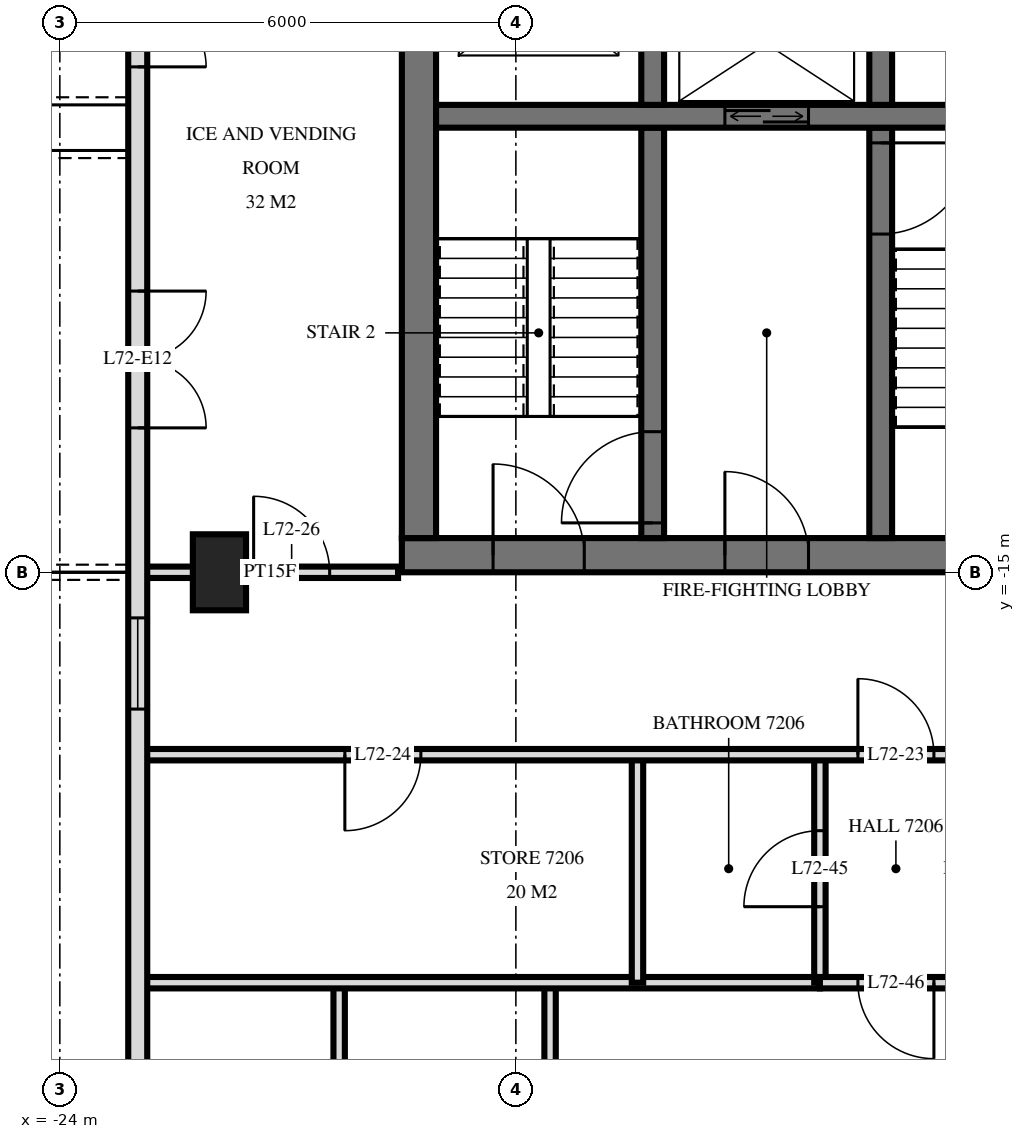
"""IFC4 building model, lengths in metres.
Left out: names, types, materials, properties, quantities, classifications, styles, units other than length and angle.
Written with IfcOpenShell. Run it as: python <this file> out.ifc"""

import sys

from ifc_helpers import new_model, si_unit, direction, frame, frame_2d, origin, origin_2d, place, context, subcontext, project, spatial, rectangle, extrude, element, fill, save


model = new_model("IFC4")
c1 = context("Model", 3, precision=1e-05, world=origin(), true_north=direction((0.0, 1.0)))
c2 = subcontext(c1, "Body", "Model", "MODEL_VIEW")
j1 = project(units=[si_unit("LENGTHUNIT", "METRE"), si_unit("PLANEANGLEUNIT", "RADIAN")], contexts=[c1])
p1 = place(None, origin())
s1 = spatial("IfcSite", under=j1, at=p1, CompositionType="ELEMENT")
p2 = place(p1, origin())
s2 = spatial("IfcBuilding", under=s1, at=p2, CompositionType="ELEMENT")
p3 = place(p2, frame((0.0, 0.0, 273.6)))
s3 = spatial("IfcBuildingStorey", under=s2, at=p3, CompositionType="ELEMENT", Elevation=273.6)
p4 = place(p3, frame((-21.9, -15.0, 0.0), z_axis=(0.0, 0.0, 1.0), x_axis=(0.0, 1.0, 0.0)))
e1 = element("IfcColumn", 1, at=p4, inside=s3, PredefinedType="COLUMN", context=c2, shape_type="SweptSolid", body=[
    extrude(rectangle(XDim=1.0, YDim=0.7, at=origin_2d()), origin(), (0.0, 0.0, 1.0), 3.5),
])
p5 = place(p3, frame((-19.5, -14.775, 0.0), z_axis=(0.0, 0.0, 1.0), x_axis=(1.0, 0.0, 0.0)))
e2 = element("IfcWall", 2, at=p5, inside=s3, PredefinedType="SHEAR", context=c2, shape_type="SweptSolid", body=[
    extrude(rectangle(XDim=9.5, YDim=0.45, at=frame_2d((4.75, 0.0))), origin(), (0.0, 0.0, 1.0), 3.5),
])
p6 = place(p5, frame((1.2, 0.0, 0.0)))
e3 = element("IfcOpeningElement", 3, at=p6, cuts=e2, PredefinedType="OPENING", context=c2, shape_type="SweptSolid", body=[
    extrude(rectangle(XDim=1.2, YDim=2.1, at=frame_2d((0.6, 1.05))), frame((0.0, 0.235, 0.0), z_axis=(0.0, -1.0, 0.0), x_axis=(1.0, 0.0, 0.0)), (0.0, 0.0, 1.0), 0.47),
])
p7 = place(p5, frame((4.25, 0.0, 0.0)))
e4 = element("IfcOpeningElement", 4, at=p7, cuts=e2, PredefinedType="OPENING", context=c2, shape_type="SweptSolid", body=[
    extrude(rectangle(XDim=1.1, YDim=2.1, at=frame_2d((0.55, 1.05))), frame((0.0, 0.235, 0.0), z_axis=(0.0, -1.0, 0.0), x_axis=(1.0, 0.0, 0.0)), (0.0, 0.0, 1.0), 0.47),
])
p8 = place(p3, frame((-19.275, -14.55, 0.0), z_axis=(0.0, 0.0, 1.0), x_axis=(0.0, 1.0, 0.0)))
e5 = element("IfcWall", 5, at=p8, inside=s3, PredefinedType="SHEAR", context=c2, shape_type="SweptSolid", body=[
    extrude(rectangle(XDim=14.1, YDim=0.45, at=frame_2d((7.05, 0.0))), origin(), (0.0, 0.0, 1.0), 3.5),
])
p9 = place(p3, frame((-19.05, -9.0, 0.0), z_axis=(0.0, 0.0, 1.0), x_axis=(1.0, 0.0, 0.0)))
e6 = element("IfcWall", 6, at=p9, inside=s3, PredefinedType="SHEAR", context=c2, shape_type="SweptSolid", body=[
    extrude(rectangle(XDim=8.7, YDim=0.3, at=frame_2d((4.35, 0.0))), origin(), (0.0, 0.0, 1.0), 3.5),
])
p10 = place(p9, frame((3.8, 0.0, 0.0)))
e7 = element("IfcOpeningElement", 7, at=p10, cuts=e6, PredefinedType="OPENING", context=c2, shape_type="SweptSolid", body=[
    extrude(rectangle(XDim=1.1, YDim=2.1, at=frame_2d((0.55, 1.05))), frame((0.0, 0.16, 0.0), z_axis=(0.0, -1.0, 0.0), x_axis=(1.0, 0.0, 0.0)), (0.0, 0.0, 1.0), 0.32),
])
p11 = place(p3, frame((-13.2, -8.85, 0.0), z_axis=(0.0, 0.0, 1.0), x_axis=(0.0, 1.0, 0.0)))
e8 = element("IfcWall", 8, at=p11, inside=s3, PredefinedType="SHEAR", context=c2, shape_type="SweptSolid", body=[
    extrude(rectangle(XDim=2.3, YDim=0.3, at=frame_2d((1.15, 0.0))), origin(), (0.0, 0.0, 1.0), 3.5),
])
p12 = place(p3, frame((-13.2, -14.55, 0.0), z_axis=(0.0, 0.0, 1.0), x_axis=(0.0, 1.0, 0.0)))
e9 = element("IfcWall", 9, at=p12, inside=s3, PredefinedType="SHEAR", context=c2, shape_type="SweptSolid", body=[
    extrude(rectangle(XDim=5.4, YDim=0.3, at=frame_2d((2.7, 0.0))), origin(), (0.0, 0.0, 1.0), 3.5),
])
p13 = place(p12, frame((4.0, 0.0, 0.0)))
e10 = element("IfcOpeningElement", 10, at=p13, cuts=e9, PredefinedType="OPENING", context=c2, shape_type="SweptSolid", body=[
    extrude(rectangle(XDim=1.2, YDim=2.1, at=frame_2d((0.6, 1.05))), frame((0.0, 0.16, 0.0), z_axis=(0.0, -1.0, 0.0), x_axis=(1.0, 0.0, 0.0)), (0.0, 0.0, 1.0), 0.32),
])
p14 = place(p3, frame((-16.2, -8.85, 0.0), z_axis=(0.0, 0.0, 1.0), x_axis=(0.0, 1.0, 0.0)))
e11 = element("IfcWall", 11, at=p14, inside=s3, PredefinedType="SHEAR", context=c2, shape_type="SweptSolid", body=[
    extrude(rectangle(XDim=2.3, YDim=0.3, at=frame_2d((1.15, 0.0))), origin(), (0.0, 0.0, 1.0), 3.5),
])
p15 = place(p3, frame((-16.2, -14.55, 0.0), z_axis=(0.0, 0.0, 1.0), x_axis=(0.0, 1.0, 0.0)))
e12 = element("IfcWall", 12, at=p15, inside=s3, PredefinedType="SHEAR", context=c2, shape_type="SweptSolid", body=[
    extrude(rectangle(XDim=5.4, YDim=0.3, at=frame_2d((2.7, 0.0))), origin(), (0.0, 0.0, 1.0), 3.5),
])
p16 = place(p15, frame((0.2, 0.0, 0.0)))
e13 = element("IfcOpeningElement", 13, at=p16, cuts=e12, PredefinedType="OPENING", context=c2, shape_type="SweptSolid", body=[
    extrude(rectangle(XDim=1.2, YDim=2.1, at=frame_2d((0.6, 1.05))), frame((0.0, 0.16, 0.0), z_axis=(0.0, -1.0, 0.0), x_axis=(1.0, 0.0, 0.0)), (0.0, 0.0, 1.0), 0.32),
])
p17 = place(p3, frame((-22.975, -3.325, 0.0), z_axis=(0.0, 0.0, 1.0), x_axis=(0.0, -1.0, 0.0)))
e14 = element("IfcWall", 14, at=p17, inside=s3, PredefinedType="SOLIDWALL", context=c2, shape_type="SweptSolid", body=[
    extrude(rectangle(XDim=25.951, YDim=0.25, at=frame_2d((12.975, 0.0))), origin(), (0.0, 0.0, 1.0), 3.22),
])
p18 = place(p17, frame((3.225, 0.0, 0.0)))
e15 = element("IfcOpeningElement", 15, at=p18, cuts=e14, PredefinedType="OPENING", context=c2, shape_type="SweptSolid", body=[
    extrude(rectangle(XDim=1.8, YDim=2.4, at=frame_2d((0.9, 1.2))), frame((0.0, 0.135, 0.0), z_axis=(0.0, -1.0, 0.0), x_axis=(1.0, 0.0, 0.0)), (0.0, 0.0, 1.0), 0.27),
])
p19 = place(p17, frame((7.975, 0.0, 0.0)))
e16 = element("IfcOpeningElement", 16, at=p19, cuts=e14, PredefinedType="OPENING", context=c2, shape_type="SweptSolid", body=[
    extrude(rectangle(XDim=1.8, YDim=2.4, at=frame_2d((0.9, 1.2))), frame((0.0, 0.135, 0.0), z_axis=(0.0, -1.0, 0.0), x_axis=(1.0, 0.0, 0.0)), (0.0, 0.0, 1.0), 0.27),
])
p20 = place(p17, frame((12.275, 0.0, 0.9)))
e17 = element("IfcOpeningElement", 17, at=p20, cuts=e14, PredefinedType="OPENING", context=c2, shape_type="SweptSolid", body=[
    extrude(rectangle(XDim=1.2, YDim=1.5, at=frame_2d((0.6, 0.75))), frame((0.0, 0.135, 0.0), z_axis=(0.0, -1.0, 0.0), x_axis=(1.0, 0.0, 0.0)), (0.0, 0.0, 1.0), 0.27),
])
p21 = place(p17, frame((18.175, 0.0, 0.0)))
e18 = element("IfcOpeningElement", 18, at=p21, cuts=e14, PredefinedType="OPENING", context=c2, shape_type="SweptSolid", body=[
    extrude(rectangle(XDim=1.8, YDim=2.4, at=frame_2d((0.9, 1.2))), frame((0.0, 0.135, 0.0), z_axis=(0.0, -1.0, 0.0), x_axis=(1.0, 0.0, 0.0)), (0.0, 0.0, 1.0), 0.27),
])
p22 = place(p17, frame((21.075, 0.0, 0.0)))
e19 = element("IfcOpeningElement", 19, at=p22, cuts=e14, PredefinedType="OPENING", context=c2, shape_type="SweptSolid", body=[
    extrude(rectangle(XDim=1.8, YDim=2.4, at=frame_2d((0.9, 1.2))), frame((0.0, 0.135, 0.0), z_axis=(0.0, -1.0, 0.0), x_axis=(1.0, 0.0, 0.0)), (0.0, 0.0, 1.0), 0.27),
])
p23 = place(p17, frame((23.825, 0.0, 0.9)))
e20 = element("IfcOpeningElement", 20, at=p23, cuts=e14, PredefinedType="OPENING", context=c2, shape_type="SweptSolid", body=[
    extrude(rectangle(XDim=1.8, YDim=1.5, at=frame_2d((0.9, 0.75))), frame((0.0, 0.135, 0.0), z_axis=(0.0, -1.0, 0.0), x_axis=(1.0, 0.0, 0.0)), (0.0, 0.0, 1.0), 0.27),
])
p24 = place(p3, frame((-14.0, -20.4, 0.0), z_axis=(0.0, 0.0, 1.0), x_axis=(0.0, 1.0, 0.0)))
e21 = element("IfcWall", 21, at=p24, inside=s3, PredefinedType="PARTITIONING", context=c2, shape_type="SweptSolid", body=[
    extrude(rectangle(XDim=3.0, YDim=0.15, at=frame_2d((1.5, 0.0))), origin(), (0.0, 0.0, 1.0), 3.22),
])
p25 = place(p24, frame((1.0, 0.0, 0.0)))
e22 = element("IfcOpeningElement", 22, at=p25, cuts=e21, PredefinedType="OPENING", context=c2, shape_type="SweptSolid", body=[
    extrude(rectangle(XDim=1.0, YDim=2.1, at=frame_2d((0.5, 1.05))), frame((0.0, 0.085, 0.0), z_axis=(0.0, -1.0, 0.0), x_axis=(1.0, 0.0, 0.0)), (0.0, 0.0, 1.0), 0.17),
])
p26 = place(p3, frame((-16.4, -20.4, 0.0), z_axis=(0.0, 0.0, 1.0), x_axis=(0.0, 1.0, 0.0)))
e23 = element("IfcWall", 23, at=p26, inside=s3, PredefinedType="PARTITIONING", context=c2, shape_type="SweptSolid", body=[
    extrude(rectangle(XDim=3.0, YDim=0.15, at=frame_2d((1.5, 0.0))), origin(), (0.0, 0.0, 1.0), 3.22),
])
p27 = place(p3, frame((-17.55, -33.62, 0.0), z_axis=(0.0, 0.0, 1.0), x_axis=(0.0, 1.0, 0.0)))
e24 = element("IfcWall", 24, at=p27, inside=s3, PredefinedType="PARTITIONING", context=c2, shape_type="SweptSolid", body=[
    extrude(rectangle(XDim=13.22, YDim=0.15, at=frame_2d((6.61, 0.0))), origin(), (0.0, 0.0, 1.0), 3.22),
])
p28 = place(p27, frame((6.09, 0.0, 0.0)))
e25 = element("IfcOpeningElement", 25, at=p28, cuts=e24, PredefinedType="OPENING", context=c2, shape_type="SweptSolid", body=[
    extrude(rectangle(XDim=0.9, YDim=2.1, at=frame_2d((0.45, 1.05))), frame((0.0, 0.085, 0.0), z_axis=(0.0, -1.0, 0.0), x_axis=(1.0, 0.0, 0.0)), (0.0, 0.0, 1.0), 0.17),
])
p29 = place(p3, frame((-20.325, -33.239, 0.0), z_axis=(0.0, 0.0, 1.0), x_axis=(0.0, 1.0, 0.0)))
e26 = element("IfcWall", 26, at=p29, inside=s3, PredefinedType="PARTITIONING", context=c2, shape_type="SweptSolid", body=[
    extrude(rectangle(XDim=12.839, YDim=0.15, at=frame_2d((6.419, 0.0))), origin(), (0.0, 0.0, 1.0), 3.22),
])
p30 = place(p29, frame((5.853, 0.0, 0.0)))
e27 = element("IfcOpeningElement", 27, at=p30, cuts=e26, PredefinedType="OPENING", context=c2, shape_type="SweptSolid", body=[
    extrude(rectangle(XDim=0.9, YDim=2.1, at=frame_2d((0.45, 1.05))), frame((0.0, 0.085, 0.0), z_axis=(0.0, -1.0, 0.0), x_axis=(1.0, 0.0, 0.0)), (0.0, 0.0, 1.0), 0.17),
])
p31 = place(p3, frame((-14.0, -20.4, 0.0), z_axis=(0.0, 0.0, 1.0), x_axis=(1.0, 0.0, 0.0)))
e28 = element("IfcWall", 28, at=p31, inside=s3, PredefinedType="PARTITIONING", context=c2, shape_type="SweptSolid", body=[
    extrude(rectangle(XDim=2.0, YDim=0.15, at=frame_2d((1.0, 0.0))), origin(), (0.0, 0.0, 1.0), 3.22),
])
p32 = place(p31, frame((0.5, 0.0, 0.0)))
e29 = element("IfcOpeningElement", 29, at=p32, cuts=e28, PredefinedType="OPENING", context=c2, shape_type="SweptSolid", body=[
    extrude(rectangle(XDim=1.0, YDim=2.1, at=frame_2d((0.5, 1.05))), frame((0.0, 0.085, 0.0), z_axis=(0.0, -1.0, 0.0), x_axis=(1.0, 0.0, 0.0)), (0.0, 0.0, 1.0), 0.17),
])
p33 = place(p3, frame((-22.92, -20.4, 0.0), z_axis=(0.0, 0.0, 1.0), x_axis=(1.0, 0.0, 0.0)))
e30 = element("IfcWall", 30, at=p33, inside=s3, PredefinedType="PARTITIONING", context=c2, shape_type="SweptSolid", body=[
    extrude(rectangle(XDim=8.92, YDim=0.15, at=frame_2d((4.46, 0.0))), origin(), (0.0, 0.0, 1.0), 3.22),
])
p34 = place(p3, frame((-22.92, -17.4, 0.0), z_axis=(0.0, 0.0, 1.0), x_axis=(1.0, 0.0, 0.0)))
e31 = element("IfcWall", 31, at=p34, inside=s3, PredefinedType="PARTITIONING", context=c2, shape_type="SweptSolid", body=[
    extrude(rectangle(XDim=45.84, YDim=0.15, at=frame_2d((22.92, 0.0))), origin(), (0.0, 0.0, 1.0), 3.22),
])
p35 = place(p34, frame((21.67, 0.0, 0.0)))
e32 = element("IfcOpeningElement", 32, at=p35, cuts=e31, PredefinedType="OPENING", context=c2, shape_type="SweptSolid", body=[
    extrude(rectangle(XDim=1.0, YDim=2.1, at=frame_2d((0.5, 1.05))), frame((0.0, 0.085, 0.0), z_axis=(0.0, -1.0, 0.0), x_axis=(1.0, 0.0, 0.0)), (0.0, 0.0, 1.0), 0.17),
])
p36 = place(p34, frame((24.77, 0.0, 0.0)))
e33 = element("IfcOpeningElement", 33, at=p36, cuts=e31, PredefinedType="OPENING", context=c2, shape_type="SweptSolid", body=[
    extrude(rectangle(XDim=1.0, YDim=2.1, at=frame_2d((0.5, 1.05))), frame((0.0, 0.085, 0.0), z_axis=(0.0, -1.0, 0.0), x_axis=(1.0, 0.0, 0.0)), (0.0, 0.0, 1.0), 0.17),
])
p37 = place(p34, frame((26.07, 0.0, 0.0)))
e34 = element("IfcOpeningElement", 34, at=p37, cuts=e31, PredefinedType="OPENING", context=c2, shape_type="SweptSolid", body=[
    extrude(rectangle(XDim=1.0, YDim=2.1, at=frame_2d((0.5, 1.05))), frame((0.0, 0.085, 0.0), z_axis=(0.0, -1.0, 0.0), x_axis=(1.0, 0.0, 0.0)), (0.0, 0.0, 1.0), 0.17),
])
p38 = place(p34, frame((30.77, 0.0, 0.0)))
e35 = element("IfcOpeningElement", 35, at=p38, cuts=e31, PredefinedType="OPENING", context=c2, shape_type="SweptSolid", body=[
    extrude(rectangle(XDim=1.0, YDim=2.1, at=frame_2d((0.5, 1.05))), frame((0.0, 0.085, 0.0), z_axis=(0.0, -1.0, 0.0), x_axis=(1.0, 0.0, 0.0)), (0.0, 0.0, 1.0), 0.17),
])
p39 = place(p34, frame((32.07, 0.0, 0.0)))
e36 = element("IfcOpeningElement", 36, at=p39, cuts=e31, PredefinedType="OPENING", context=c2, shape_type="SweptSolid", body=[
    extrude(rectangle(XDim=1.0, YDim=2.1, at=frame_2d((0.5, 1.05))), frame((0.0, 0.085, 0.0), z_axis=(0.0, -1.0, 0.0), x_axis=(1.0, 0.0, 0.0)), (0.0, 0.0, 1.0), 0.17),
])
p40 = place(p34, frame((9.42, 0.0, 0.0)))
e37 = element("IfcOpeningElement", 37, at=p40, cuts=e31, PredefinedType="OPENING", context=c2, shape_type="SweptSolid", body=[
    extrude(rectangle(XDim=1.0, YDim=2.1, at=frame_2d((0.5, 1.05))), frame((0.0, 0.085, 0.0), z_axis=(0.0, -1.0, 0.0), x_axis=(1.0, 0.0, 0.0)), (0.0, 0.0, 1.0), 0.17),
])
p41 = place(p34, frame((2.67, 0.0, 0.0)))
e38 = element("IfcOpeningElement", 38, at=p41, cuts=e31, PredefinedType="OPENING", context=c2, shape_type="SweptSolid", body=[
    extrude(rectangle(XDim=1.0, YDim=2.1, at=frame_2d((0.5, 1.05))), frame((0.0, 0.085, 0.0), z_axis=(0.0, -1.0, 0.0), x_axis=(1.0, 0.0, 0.0)), (0.0, 0.0, 1.0), 0.17),
])
p42 = place(p34, frame((37.82, 0.0, 0.0)))
e39 = element("IfcOpeningElement", 39, at=p42, cuts=e31, PredefinedType="OPENING", context=c2, shape_type="SweptSolid", body=[
    extrude(rectangle(XDim=1.0, YDim=2.1, at=frame_2d((0.5, 1.05))), frame((0.0, 0.085, 0.0), z_axis=(0.0, -1.0, 0.0), x_axis=(1.0, 0.0, 0.0)), (0.0, 0.0, 1.0), 0.17),
])
p43 = place(p3, frame((-22.92, -15.0, 0.0), z_axis=(0.0, 0.0, 1.0), x_axis=(1.0, 0.0, 0.0)))
e40 = element("IfcWall", 40, at=p43, inside=s3, PredefinedType="PARTITIONING", context=c2, shape_type="SweptSolid", body=[
    extrude(rectangle(XDim=3.37, YDim=0.15, at=frame_2d((1.685, 0.0))), origin(), (0.0, 0.0, 1.0), 3.22),
])
p44 = place(p43, frame((1.47, 0.0, 0.0)))
e41 = element("IfcOpeningElement", 41, at=p44, cuts=e40, PredefinedType="OPENING", context=c2, shape_type="SweptSolid", body=[
    extrude(rectangle(XDim=1.0, YDim=2.1, at=frame_2d((0.5, 1.05))), frame((0.0, 0.085, 0.0), z_axis=(0.0, -1.0, 0.0), x_axis=(1.0, 0.0, 0.0)), (0.0, 0.0, 1.0), 0.17),
])
p45 = place(p18, origin())
e42 = element("IfcDoor", 42, at=p45, inside=s3, OperationType="DOUBLE_DOOR_SINGLE_SWING", PredefinedType="DOOR", context=c2, shape_type="SweptSolid", body=[
    extrude(rectangle(XDim=1.8, YDim=2.4, at=frame_2d((0.9, 1.2))), frame((0.0, 0.025, 0.0), z_axis=(0.0, -1.0, 0.0), x_axis=(1.0, 0.0, 0.0)), (0.0, 0.0, 1.0), 0.05),
])
fill(e15, e42)
p46 = place(p19, origin())
e43 = element("IfcDoor", 43, at=p46, inside=s3, OperationType="DOUBLE_DOOR_SINGLE_SWING", PredefinedType="DOOR", context=c2, shape_type="SweptSolid", body=[
    extrude(rectangle(XDim=1.8, YDim=2.4, at=frame_2d((0.9, 1.2))), frame((0.0, 0.025, 0.0), z_axis=(0.0, -1.0, 0.0), x_axis=(1.0, 0.0, 0.0)), (0.0, 0.0, 1.0), 0.05),
])
fill(e16, e43)
p47 = place(p20, origin())
e44 = element("IfcWindow", 44, at=p47, inside=s3, PartitioningType="SINGLE_PANEL", PredefinedType="WINDOW", context=c2, shape_type="SweptSolid", body=[
    extrude(rectangle(XDim=1.2, YDim=1.5, at=frame_2d((0.6, 0.75))), frame((0.0, 0.03, 0.0), z_axis=(0.0, -1.0, 0.0), x_axis=(1.0, 0.0, 0.0)), (0.0, 0.0, 1.0), 0.06),
])
fill(e17, e44)
p48 = place(p10, origin())
e45 = element("IfcDoor", 45, at=p48, inside=s3, OperationType="DOUBLE_DOOR_SLIDING", PredefinedType="USERDEFINED", context=c2, shape_type="SweptSolid", body=[
    extrude(rectangle(XDim=1.1, YDim=2.1, at=frame_2d((0.55, 1.05))), frame((0.0, 0.025, 0.0), z_axis=(0.0, -1.0, 0.0), x_axis=(1.0, 0.0, 0.0)), (0.0, 0.0, 1.0), 0.05),
])
fill(e7, e45)
p49 = place(p6, origin())
e46 = element("IfcDoor", 46, at=p49, inside=s3, OperationType="SINGLE_SWING_RIGHT", PredefinedType="DOOR", context=c2, shape_type="SweptSolid", body=[
    extrude(rectangle(XDim=1.2, YDim=2.1, at=frame_2d((0.6, 1.05))), frame((0.0, 0.025, 0.0), z_axis=(0.0, -1.0, 0.0), x_axis=(1.0, 0.0, 0.0)), (0.0, 0.0, 1.0), 0.05),
])
fill(e3, e46)
p50 = place(p7, origin())
e47 = element("IfcDoor", 47, at=p50, inside=s3, OperationType="SINGLE_SWING_RIGHT", PredefinedType="DOOR", context=c2, shape_type="SweptSolid", body=[
    extrude(rectangle(XDim=1.1, YDim=2.1, at=frame_2d((0.55, 1.05))), frame((0.0, 0.025, 0.0), z_axis=(0.0, -1.0, 0.0), x_axis=(1.0, 0.0, 0.0)), (0.0, 0.0, 1.0), 0.05),
])
fill(e4, e47)
p51 = place(p13, frame((0.6, 0.0, 0.0), z_axis=(0.0, 0.0, 1.0), x_axis=(-1.0, 0.0, 0.0)))
e48 = element("IfcDoor", 48, at=p51, inside=s3, OperationType="SINGLE_SWING_RIGHT", PredefinedType="DOOR", context=c2, shape_type="SweptSolid", body=[
    extrude(rectangle(XDim=1.2, YDim=2.1, at=frame_2d((0.0, 1.05))), frame((0.0, -0.025, 0.0), z_axis=(0.0, 1.0, 0.0), x_axis=(-1.0, 0.0, 0.0)), (0.0, 0.0, 1.0), 0.05),
])
fill(e10, e48)
p52 = place(p16, origin())
e49 = element("IfcDoor", 49, at=p52, inside=s3, OperationType="SINGLE_SWING_RIGHT", PredefinedType="DOOR", context=c2, shape_type="SweptSolid", body=[
    extrude(rectangle(XDim=1.2, YDim=2.1, at=frame_2d((0.6, 1.05))), frame((0.0, 0.025, 0.0), z_axis=(0.0, -1.0, 0.0), x_axis=(1.0, 0.0, 0.0)), (0.0, 0.0, 1.0), 0.05),
])
fill(e13, e49)
p53 = place(p40, origin())
e50 = element("IfcDoor", 50, at=p53, inside=s3, OperationType="SINGLE_SWING_RIGHT", PredefinedType="DOOR", context=c2, shape_type="SweptSolid", body=[
    extrude(rectangle(XDim=1.0, YDim=2.1, at=frame_2d((0.5, 1.05))), frame((0.0, 0.025, 0.0), z_axis=(0.0, -1.0, 0.0), x_axis=(1.0, 0.0, 0.0)), (0.0, 0.0, 1.0), 0.05),
])
fill(e37, e50)
p54 = place(p41, frame((0.5, 0.0, 0.0), z_axis=(0.0, 0.0, 1.0), x_axis=(-1.0, 0.0, 0.0)))
e51 = element("IfcDoor", 51, at=p54, inside=s3, OperationType="SINGLE_SWING_LEFT", PredefinedType="DOOR", context=c2, shape_type="SweptSolid", body=[
    extrude(rectangle(XDim=1.0, YDim=2.1, at=frame_2d((0.0, 1.05))), frame((0.0, -0.025, 0.0), z_axis=(0.0, 1.0, 0.0), x_axis=(-1.0, 0.0, 0.0)), (0.0, 0.0, 1.0), 0.05),
])
fill(e38, e51)
p55 = place(p44, origin())
e52 = element("IfcDoor", 52, at=p55, inside=s3, OperationType="SINGLE_SWING_RIGHT", PredefinedType="DOOR", context=c2, shape_type="SweptSolid", body=[
    extrude(rectangle(XDim=1.0, YDim=2.1, at=frame_2d((0.5, 1.05))), frame((0.0, 0.025, 0.0), z_axis=(0.0, -1.0, 0.0), x_axis=(1.0, 0.0, 0.0)), (0.0, 0.0, 1.0), 0.05),
])
fill(e41, e52)
p56 = place(p25, origin())
e53 = element("IfcDoor", 53, at=p56, inside=s3, OperationType="SINGLE_SWING_RIGHT", PredefinedType="DOOR", context=c2, shape_type="SweptSolid", body=[
    extrude(rectangle(XDim=1.0, YDim=2.1, at=frame_2d((0.5, 1.05))), frame((0.0, 0.025, 0.0), z_axis=(0.0, -1.0, 0.0), x_axis=(1.0, 0.0, 0.0)), (0.0, 0.0, 1.0), 0.05),
])
fill(e22, e53)
p57 = place(p32, frame((0.5, 0.0, 0.0), z_axis=(0.0, 0.0, 1.0), x_axis=(-1.0, 0.0, 0.0)))
e54 = element("IfcDoor", 54, at=p57, inside=s3, OperationType="SINGLE_SWING_RIGHT", PredefinedType="DOOR", context=c2, shape_type="SweptSolid", body=[
    extrude(rectangle(XDim=1.0, YDim=2.1, at=frame_2d((0.0, 1.05))), frame((0.0, -0.025, 0.0), z_axis=(0.0, 1.0, 0.0), x_axis=(-1.0, 0.0, 0.0)), (0.0, 0.0, 1.0), 0.05),
])
fill(e29, e54)
save(model, sys.argv[1])
